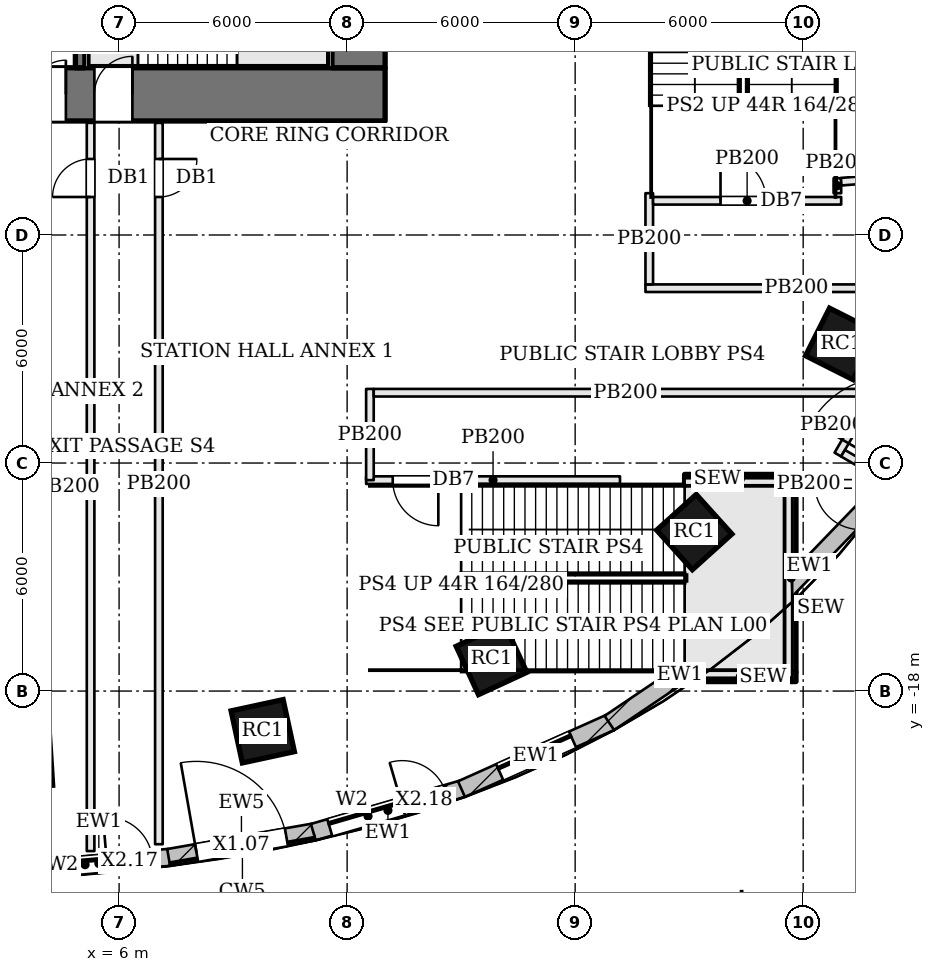
"""IFC4 building model, lengths in metres.
Left out: names, types, materials, properties, quantities, classifications, styles, units other than length and angle.
Written with IfcOpenShell. Run it as: python <this file> out.ifc"""

import sys

from ifc_helpers import new_model, si_unit, direction, frame, frame_2d, origin, origin_2d, place, context, subcontext, project, spatial, rectangle, extrude, element, fill, save


model = new_model("IFC4")
c1 = context("Model", 3, precision=1e-05, world=origin(), true_north=direction((0.0, 1.0)))
c2 = subcontext(c1, "Body", "Model", "MODEL_VIEW")
j1 = project(units=[si_unit("LENGTHUNIT", "METRE"), si_unit("PLANEANGLEUNIT", "RADIAN")], contexts=[c1])
p1 = place(None, origin())
s1 = spatial("IfcSite", under=j1, at=p1, CompositionType="ELEMENT")
p2 = place(p1, origin())
s2 = spatial("IfcBuilding", under=s1, at=p2, CompositionType="ELEMENT")
p3 = place(p2, origin())
s3 = spatial("IfcBuildingStorey", under=s2, at=p3, CompositionType="ELEMENT", Elevation=0.0)
p4 = place(p3, frame((-13.0, -2.3, 0.0), z_axis=(0.0, 0.0, 1.0), x_axis=(1.0, 0.0, 0.0)))
e1 = element("IfcWall", 1, at=p4, inside=s3, PredefinedType="SHEAR", context=c2, shape_type="SweptSolid", body=[
    extrude(rectangle(XDim=26.0, YDim=1.4, at=frame_2d((13.0, 0.0))), origin(), (0.0, 0.0, 1.0), 7.2),
])
p5 = place(p4, frame((9.275, 0.0, 0.0)))
e2 = element("IfcOpeningElement", 2, at=p5, cuts=e1, PredefinedType="OPENING", context=c2, shape_type="SweptSolid", body=[
    extrude(rectangle(XDim=0.9, YDim=2.1, at=frame_2d((0.45, 1.05))), frame((0.0, 0.71, 0.0), z_axis=(0.0, -1.0, 0.0), x_axis=(1.0, 0.0, 0.0)), (0.0, 0.0, 1.0), 1.42),
])
p6 = place(p4, frame((12.525, 0.0, 0.0)))
e3 = element("IfcOpeningElement", 3, at=p6, cuts=e1, PredefinedType="OPENING", context=c2, shape_type="SweptSolid", body=[
    extrude(rectangle(XDim=0.9, YDim=2.1, at=frame_2d((0.45, 1.05))), frame((0.0, 0.71, 0.0), z_axis=(0.0, -1.0, 0.0), x_axis=(1.0, 0.0, 0.0)), (0.0, 0.0, 1.0), 1.42),
])
p7 = place(p4, frame((15.0, 0.0, 0.0)))
e4 = element("IfcOpeningElement", 4, at=p7, cuts=e1, PredefinedType="OPENING", context=c2, shape_type="SweptSolid", body=[
    extrude(rectangle(XDim=1.0, YDim=2.1, at=frame_2d((0.5, 1.05))), frame((0.0, 0.71, 0.0), z_axis=(0.0, -1.0, 0.0), x_axis=(1.0, 0.0, 0.0)), (0.0, 0.0, 1.0), 1.42),
])
p8 = place(p4, frame((16.7, 0.0, 0.0)))
e5 = element("IfcOpeningElement", 5, at=p8, cuts=e1, PredefinedType="OPENING", context=c2, shape_type="SweptSolid", body=[
    extrude(rectangle(XDim=0.9, YDim=2.1, at=frame_2d((0.45, 1.05))), frame((0.0, 0.71, 0.0), z_axis=(0.0, -1.0, 0.0), x_axis=(1.0, 0.0, 0.0)), (0.0, 0.0, 1.0), 1.42),
])
p9 = place(p4, frame((6.65, 0.0, 0.0)))
e6 = element("IfcOpeningElement", 6, at=p9, cuts=e1, PredefinedType="OPENING", context=c2, shape_type="SweptSolid", body=[
    extrude(rectangle(XDim=1.0, YDim=2.1, at=frame_2d((0.5, 1.05))), frame((0.0, 0.71, 0.0), z_axis=(0.0, -1.0, 0.0), x_axis=(1.0, 0.0, 0.0)), (0.0, 0.0, 1.0), 1.42),
])
p10 = place(p4, frame((18.35, 0.0, 0.0)))
e7 = element("IfcOpeningElement", 7, at=p10, cuts=e1, PredefinedType="OPENING", context=c2, shape_type="SweptSolid", body=[
    extrude(rectangle(XDim=1.0, YDim=2.1, at=frame_2d((0.5, 1.05))), frame((0.0, 0.71, 0.0), z_axis=(0.0, -1.0, 0.0), x_axis=(1.0, 0.0, 0.0)), (0.0, 0.0, 1.0), 1.42),
])
p11 = place(p3, frame((12.3, -1.6, 0.0), z_axis=(0.0, 0.0, 1.0), x_axis=(0.0, 1.0, 0.0)))
e8 = element("IfcWall", 8, at=p11, inside=s3, PredefinedType="SHEAR", context=c2, shape_type="SweptSolid", body=[
    extrude(rectangle(XDim=12.2, YDim=1.4, at=frame_2d((6.1, 0.0))), origin(), (0.0, 0.0, 1.0), 7.2),
])
p12 = place(p11, frame((6.8, 0.0, 0.0)))
e9 = element("IfcOpeningElement", 9, at=p12, cuts=e8, PredefinedType="OPENING", context=c2, shape_type="SweptSolid", body=[
    extrude(rectangle(XDim=1.8, YDim=2.1, at=frame_2d((0.9, 1.05))), frame((0.0, 0.71, 0.0), z_axis=(0.0, -1.0, 0.0), x_axis=(1.0, 0.0, 0.0)), (0.0, 0.0, 1.0), 1.42),
])
for number, where, z_axis, x_axis in (
    (10, (3.509, -19.824, 0.0), (0.0, 0.0, 1.0), (0.998, 0.063, 0.0)),
    (11, (9.78, -19.058, 0.0), (0.0, 0.0, 1.0), (0.977, 0.211, 0.0)),
    (12, (15.799, -17.165, 0.0), (0.0, 0.0, 1.0), (0.908, 0.419, 0.0)),
    (13, (21.135, -13.817, 0.0), (0.0, 0.0, 1.0), (0.743, 0.67, 0.0)),
    (14, (25.003, -8.866, 0.0), (0.0, 0.0, 1.0), (0.45, 0.893, 0.0)),
):
    element("IfcColumn", number, at=place(p3, frame(where, z_axis=z_axis, x_axis=x_axis)), inside=s3, PredefinedType="COLUMN", context=c2, shape_type="SweptSolid", body=[
        extrude(rectangle(XDim=1.4, YDim=1.4, at=origin_2d()), origin(), (0.0, 0.0, 1.0), 7.2),
    ])
p13 = place(p3, frame((3.611, -22.698, 0.0), z_axis=(0.0, 0.0, 1.0), x_axis=(0.996259982326, 0.086406293838, 0.0)))
e15 = element("IfcWall", 15, at=p13, inside=s3, PredefinedType="SOLIDWALL", context=c2, shape_type="SweptSolid", body=[
    extrude(rectangle(XDim=3.727, YDim=0.45, at=frame_2d((1.863, 0.0))), origin(), (0.0, 0.0, 1.0), 6.95),
])
p14 = place(p13, frame((0.45, 0.0, 0.9)))
e16 = element("IfcOpeningElement", 16, at=p14, cuts=e15, PredefinedType="OPENING", context=c2, shape_type="SweptSolid", body=[
    extrude(rectangle(XDim=2.1, YDim=5.0, at=frame_2d((1.05, 2.5))), frame((0.0, 0.235, 0.0), z_axis=(0.0, -1.0, 0.0), x_axis=(1.0, 0.0, 0.0)), (0.0, 0.0, 1.0), 0.47),
])
p15 = place(p13, frame((2.077, 0.0, 0.0)))
e17 = element("IfcOpeningElement", 17, at=p15, cuts=e15, PredefinedType="OPENING", context=c2, shape_type="SweptSolid", body=[
    extrude(rectangle(XDim=1.2, YDim=2.4, at=frame_2d((0.6, 1.2))), frame((0.0, 0.235, 0.0), z_axis=(0.0, -1.0, 0.0), x_axis=(1.0, 0.0, 0.0)), (0.0, 0.0, 1.0), 0.47),
])
p16 = place(p3, frame((7.304, -22.378, 0.0), z_axis=(0.0, 0.0, 1.0), x_axis=(0.984947461591, 0.172853978566, 0.0)))
e18 = element("IfcWall", 18, at=p16, inside=s3, PredefinedType="SOLIDWALL", context=c2, shape_type="SweptSolid", body=[
    extrude(rectangle(XDim=3.888, YDim=0.45, at=frame_2d((1.944, 0.0))), origin(), (0.0, 0.0, 1.0), 3.55),
])
p17 = place(p16, frame((0.744, 0.0, 0.0)))
e19 = element("IfcOpeningElement", 19, at=p17, cuts=e18, PredefinedType="OPENING", context=c2, shape_type="SweptSolid", body=[
    extrude(rectangle(XDim=2.4, YDim=3.2, at=frame_2d((1.2, 1.6))), frame((0.0, 0.235, 0.0), z_axis=(0.0, -1.0, 0.0), x_axis=(1.0, 0.0, 0.0)), (0.0, 0.0, 1.0), 0.47),
])
p18 = place(p3, frame((11.11, -21.712, 0.0), z_axis=(0.0, 0.0, 1.0), x_axis=(0.960186274122, 0.279360553743, 0.0)))
e20 = element("IfcWall", 20, at=p18, inside=s3, PredefinedType="SOLIDWALL", context=c2, shape_type="SweptSolid", body=[
    extrude(rectangle(XDim=4.091, YDim=0.45, at=frame_2d((2.045, 0.0))), origin(), (0.0, 0.0, 1.0), 6.95),
])
p19 = place(p18, frame((0.45, 0.0, 0.9)))
e21 = element("IfcOpeningElement", 21, at=p19, cuts=e20, PredefinedType="OPENING", context=c2, shape_type="SweptSolid", body=[
    extrude(rectangle(XDim=2.1, YDim=5.0, at=frame_2d((1.05, 2.5))), frame((0.0, 0.235, 0.0), z_axis=(0.0, -1.0, 0.0), x_axis=(1.0, 0.0, 0.0)), (0.0, 0.0, 1.0), 0.47),
])
p20 = place(p18, frame((2.441, 0.0, 0.0)))
e22 = element("IfcOpeningElement", 22, at=p20, cuts=e20, PredefinedType="OPENING", context=c2, shape_type="SweptSolid", body=[
    extrude(rectangle(XDim=1.2, YDim=2.4, at=frame_2d((0.6, 1.2))), frame((0.0, 0.235, 0.0), z_axis=(0.0, -1.0, 0.0), x_axis=(1.0, 0.0, 0.0)), (0.0, 0.0, 1.0), 0.47),
])
p21 = place(p3, frame((15.009, -20.58, 0.0), z_axis=(0.0, 0.0, 1.0), x_axis=(0.912571415594, 0.408917365052, 0.0)))
e23 = element("IfcWall", 23, at=p21, inside=s3, PredefinedType="SOLIDWALL", context=c2, shape_type="SweptSolid", body=[
    extrude(rectangle(XDim=4.301, YDim=0.45, at=frame_2d((2.15, 0.0))), origin(), (0.0, 0.0, 1.0), 6.95),
])
p22 = place(p21, frame((1.101, 0.0, 0.9)))
e24 = element("IfcOpeningElement", 24, at=p22, cuts=e23, PredefinedType="OPENING", context=c2, shape_type="SweptSolid", body=[
    extrude(rectangle(XDim=2.1, YDim=5.0, at=frame_2d((1.05, 2.5))), frame((0.0, 0.235, 0.0), z_axis=(0.0, -1.0, 0.0), x_axis=(1.0, 0.0, 0.0)), (0.0, 0.0, 1.0), 0.47),
])
p23 = place(p3, frame((18.9, -18.84, 0.0), z_axis=(0.0, 0.0, 1.0), x_axis=(0.828976924359, 0.559282807604, 0.0)))
e25 = element("IfcWall", 25, at=p23, inside=s3, PredefinedType="SOLIDWALL", context=c2, shape_type="SweptSolid", body=[
    extrude(rectangle(XDim=4.479, YDim=0.45, at=frame_2d((2.24, 0.0))), origin(), (0.0, 0.0, 1.0), 6.95),
])
p24 = place(p3, frame((22.577, -16.365, 0.0), z_axis=(0.0, 0.0, 1.0), x_axis=(0.694191591241, 0.719790271294, 0.0)))
e26 = element("IfcWall", 26, at=p24, inside=s3, PredefinedType="SOLIDWALL", context=c2, shape_type="SweptSolid", body=[
    extrude(rectangle(XDim=4.597, YDim=0.45, at=frame_2d((2.298, 0.0))), origin(), (0.0, 0.0, 1.0), 6.95),
])
p25 = place(p3, frame((4.975, 10.6, 0.0), z_axis=(0.0, 0.0, 1.0), x_axis=(0.0, -1.0, 0.0)))
e27 = element("IfcWall", 27, at=p25, inside=s3, PredefinedType="SOLIDWALL", context=c2, shape_type="SweptSolid", body=[
    extrude(rectangle(XDim=12.2, YDim=0.25, at=frame_2d((6.1, 0.0))), origin(), (0.0, 0.0, 1.0), 6.95),
])
p26 = place(p25, frame((4.65, 0.0, 0.0)))
e28 = element("IfcOpeningElement", 28, at=p26, cuts=e27, PredefinedType="OPENING", context=c2, shape_type="SweptSolid", body=[
    extrude(rectangle(XDim=1.2, YDim=2.1, at=frame_2d((0.6, 1.05))), frame((0.0, 0.135, 0.0), z_axis=(0.0, -1.0, 0.0), x_axis=(1.0, 0.0, 0.0)), (0.0, 0.0, 1.0), 0.27),
])
p27 = place(p3, frame((7.047, -3.05, 0.0), z_axis=(0.0, 0.0, 1.0), x_axis=(0.0, -1.0, 0.0)))
e29 = element("IfcWall", 29, at=p27, inside=s3, PredefinedType="PARTITIONING", context=c2, shape_type="SweptSolid", body=[
    extrude(rectangle(XDim=18.98, YDim=0.2, at=frame_2d((9.49, 0.0))), origin(), (0.0, 0.0, 1.0), 6.23),
])
p28 = place(p27, frame((0.95, 0.0, 0.0)))
e30 = element("IfcOpeningElement", 30, at=p28, cuts=e29, PredefinedType="OPENING", context=c2, shape_type="SweptSolid", body=[
    extrude(rectangle(XDim=1.0, YDim=2.1, at=frame_2d((0.5, 1.05))), frame((0.0, 0.11, 0.0), z_axis=(0.0, -1.0, 0.0), x_axis=(1.0, 0.0, 0.0)), (0.0, 0.0, 1.0), 0.22),
])
p29 = place(p3, frame((5.25, -22.21, 0.0), z_axis=(0.0, 0.0, 1.0), x_axis=(0.0, 1.0, 0.0)))
e31 = element("IfcWall", 31, at=p29, inside=s3, PredefinedType="PARTITIONING", context=c2, shape_type="SweptSolid", body=[
    extrude(rectangle(XDim=19.16, YDim=0.2, at=frame_2d((9.58, 0.0))), origin(), (0.0, 0.0, 1.0), 6.23),
])
p30 = place(p29, frame((17.21, 0.0, 0.0)))
e32 = element("IfcOpeningElement", 32, at=p30, cuts=e31, PredefinedType="OPENING", context=c2, shape_type="SweptSolid", body=[
    extrude(rectangle(XDim=1.0, YDim=2.1, at=frame_2d((0.5, 1.05))), frame((0.0, 0.11, 0.0), z_axis=(0.0, -1.0, 0.0), x_axis=(1.0, 0.0, 0.0)), (0.0, 0.0, 1.0), 0.22),
])
p31 = place(p3, frame((27.8, -7.4, 0.0), z_axis=(0.0, 0.0, 1.0), x_axis=(-1.0, 0.0, 0.0)))
e33 = element("IfcWall", 33, at=p31, inside=s3, PredefinedType="PARTITIONING", context=c2, shape_type="SweptSolid", body=[
    extrude(rectangle(XDim=7.95, YDim=0.2, at=frame_2d((3.975, 0.0))), origin(), (0.0, 0.0, 1.0), 6.23),
])
p32 = place(p3, frame((19.95, -7.3, 0.0), z_axis=(0.0, 0.0, 1.0), x_axis=(0.0, 1.0, 0.0)))
e34 = element("IfcWall", 34, at=p32, inside=s3, PredefinedType="PARTITIONING", context=c2, shape_type="SweptSolid", body=[
    extrude(rectangle(XDim=2.4, YDim=0.2, at=frame_2d((1.2, 0.0))), origin(), (0.0, 0.0, 1.0), 6.23),
])
p33 = place(p3, frame((20.05, -5.1, 0.0), z_axis=(0.0, 0.0, 1.0), x_axis=(1.0, 0.0, 0.0)))
e35 = element("IfcWall", 35, at=p33, inside=s3, PredefinedType="PARTITIONING", context=c2, shape_type="SweptSolid", body=[
    extrude(rectangle(XDim=4.95, YDim=0.2, at=frame_2d((2.475, 0.0))), origin(), (0.0, 0.0, 1.0), 6.23),
])
p34 = place(p33, frame((1.775, 0.0, 0.0)))
e36 = element("IfcOpeningElement", 36, at=p34, cuts=e35, PredefinedType="OPENING", context=c2, shape_type="SweptSolid", body=[
    extrude(rectangle(XDim=1.2, YDim=2.1, at=frame_2d((0.6, 1.05))), frame((0.0, 0.11, 0.0), z_axis=(0.0, -1.0, 0.0), x_axis=(1.0, 0.0, 0.0)), (0.0, 0.0, 1.0), 0.22),
])
p35 = place(p3, frame((24.9, -4.9, 0.0), z_axis=(0.0, 0.0, 1.0), x_axis=(0.0, 1.0, 0.0)))
e37 = element("IfcWall", 37, at=p35, inside=s3, PredefinedType="PARTITIONING", context=c2, shape_type="SweptSolid", body=[
    extrude(rectangle(XDim=0.394, YDim=0.2, at=frame_2d((0.197, 0.0))), origin(), (0.0, 0.0, 1.0), 6.23),
])
p36 = place(p3, frame((25.0, -4.598, 0.0), z_axis=(0.0, 0.0, 1.0), x_axis=(0.996848217345, 0.079332411888, 0.0)))
e38 = element("IfcWall", 38, at=p36, inside=s3, PredefinedType="PARTITIONING", context=c2, shape_type="SweptSolid", body=[
    extrude(rectangle(XDim=3.314, YDim=0.2, at=frame_2d((1.657, 0.0))), origin(), (0.0, 0.0, 1.0), 6.23),
])
p37 = place(p3, frame((25.66, -12.55, 0.0), z_axis=(0.0, 0.0, 1.0), x_axis=(-1.0, 0.0, 0.0)))
e39 = element("IfcWall", 39, at=p37, inside=s3, PredefinedType="PARTITIONING", context=c2, shape_type="SweptSolid", body=[
    extrude(rectangle(XDim=1.83, YDim=0.2, at=frame_2d((0.915, 0.0))), origin(), (0.0, 0.0, 1.0), 6.23),
])
p38 = place(p37, frame((0.153, 0.0, 0.0)))
e40 = element("IfcOpeningElement", 40, at=p38, cuts=e39, PredefinedType="OPENING", context=c2, shape_type="SweptSolid", body=[
    extrude(rectangle(XDim=1.2, YDim=2.1, at=frame_2d((0.6, 1.05))), frame((0.0, 0.11, 0.0), z_axis=(0.0, -1.0, 0.0), x_axis=(1.0, 0.0, 0.0)), (0.0, 0.0, 1.0), 0.22),
])
p39 = place(p3, frame((19.18, -12.45, 0.0), z_axis=(0.0, 0.0, 1.0), x_axis=(-1.0, 0.0, 0.0)))
e41 = element("IfcWall", 41, at=p39, inside=s3, PredefinedType="PARTITIONING", context=c2, shape_type="SweptSolid", body=[
    extrude(rectangle(XDim=6.68, YDim=0.2, at=frame_2d((3.34, 0.0))), origin(), (0.0, 0.0, 1.0), 6.23),
])
p40 = place(p39, frame((4.78, 0.0, 0.0)))
e42 = element("IfcOpeningElement", 42, at=p40, cuts=e41, PredefinedType="OPENING", context=c2, shape_type="SweptSolid", body=[
    extrude(rectangle(XDim=1.2, YDim=2.1, at=frame_2d((0.6, 1.05))), frame((0.0, 0.11, 0.0), z_axis=(0.0, -1.0, 0.0), x_axis=(1.0, 0.0, 0.0)), (0.0, 0.0, 1.0), 0.22),
])
p41 = place(p3, frame((12.6, -12.45, 0.0), z_axis=(0.0, 0.0, 1.0), x_axis=(0.0, 1.0, 0.0)))
e43 = element("IfcWall", 43, at=p41, inside=s3, PredefinedType="PARTITIONING", context=c2, shape_type="SweptSolid", body=[
    extrude(rectangle(XDim=2.4, YDim=0.2, at=frame_2d((1.2, 0.0))), origin(), (0.0, 0.0, 1.0), 6.23),
])
p42 = place(p3, frame((12.7, -10.15, 0.0), z_axis=(0.0, 0.0, 1.0), x_axis=(1.0, 0.0, 0.0)))
e44 = element("IfcWall", 44, at=p42, inside=s3, PredefinedType="PARTITIONING", context=c2, shape_type="SweptSolid", body=[
    extrude(rectangle(XDim=13.257, YDim=0.2, at=frame_2d((6.628, 0.0))), origin(), (0.0, 0.0, 1.0), 6.23),
])
p43 = place(p3, frame((25.807, -10.236, 0.0), z_axis=(0.0, 0.0, 1.0), x_axis=(-0.50189432983, -0.864928946032, 0.0)))
e45 = element("IfcWall", 45, at=p43, inside=s3, PredefinedType="PARTITIONING", context=c2, shape_type="SweptSolid", body=[
    extrude(rectangle(XDim=1.783, YDim=0.2, at=frame_2d((0.891, 0.0))), origin(), (0.0, 0.0, 1.0), 6.23),
])
p44 = place(p3, frame((25.048, -11.742, 0.0), z_axis=(0.0, 0.0, 1.0), x_axis=(0.864728870448, -0.502238967638, 0.0)))
e46 = element("IfcWall", 46, at=p44, inside=s3, PredefinedType="PARTITIONING", context=c2, shape_type="SweptSolid", body=[
    extrude(rectangle(XDim=0.968, YDim=0.2, at=frame_2d((0.484, 0.0))), origin(), (0.0, 0.0, 1.0), 6.23),
])
p45 = place(p3, frame((23.685, -17.5, 0.0), z_axis=(0.0, 0.0, 1.0), x_axis=(0.0, 1.0, 0.0)))
e47 = element("IfcWall", 47, at=p45, inside=s3, PredefinedType="SOLIDWALL", context=c2, shape_type="SweptSolid", body=[
    extrude(rectangle(XDim=4.95, YDim=0.25, at=frame_2d((2.475, 0.0))), origin(), (0.0, 0.0, 1.0), 6.95),
])
for number, where, z_axis, x_axis in (
    (48, (20.88, -17.625, 0.0), (0.0, 0.0, 1.0), (1.0, 0.0, 0.0)),
    (49, (20.88, -12.425, 0.0), (0.0, 0.0, 1.0), (1.0, 0.0, 0.0)),
):
    element("IfcWall", number, at=place(p3, frame(where, z_axis=z_axis, x_axis=x_axis)), inside=s3, PredefinedType="SOLIDWALL", context=c2, shape_type="SweptSolid", body=[
        extrude(rectangle(XDim=2.93, YDim=0.25, at=frame_2d((1.465, 0.0))), origin(), (0.0, 0.0, 1.0), 6.95),
    ])
p46 = place(p14, origin())
e50 = element("IfcWindow", 50, at=p46, inside=s3, PartitioningType="SINGLE_PANEL", PredefinedType="WINDOW", context=c2, shape_type="SweptSolid", body=[
    extrude(rectangle(XDim=2.1, YDim=5.0, at=frame_2d((1.05, 2.5))), frame((0.0, 0.135, 0.0), z_axis=(0.0, -1.0, 0.0), x_axis=(1.0, 0.0, 0.0)), (0.0, 0.0, 1.0), 0.06),
])
fill(e16, e50)
p47 = place(p15, frame((1.2, 0.0, 0.0), z_axis=(0.0, 0.0, 1.0), x_axis=(-1.0, 0.0, 0.0)))
e51 = element("IfcDoor", 51, at=p47, inside=s3, OperationType="SINGLE_SWING_LEFT", PredefinedType="DOOR", context=c2, shape_type="SweptSolid", body=[
    extrude(rectangle(XDim=1.2, YDim=2.4, at=frame_2d((0.6, 1.2))), frame((0.0, 0.025, 0.0), z_axis=(0.0, -1.0, 0.0), x_axis=(1.0, 0.0, 0.0)), (0.0, 0.0, 1.0), 0.05),
])
fill(e17, e51)
p48 = place(p17, origin())
e52 = element("IfcDoor", 52, at=p48, inside=s3, OperationType="DOUBLE_DOOR_DOUBLE_SWING", PredefinedType="DOOR", context=c2, shape_type="SweptSolid", body=[
    extrude(rectangle(XDim=2.4, YDim=3.2, at=frame_2d((1.2, 1.6))), frame((0.0, 0.025, 0.0), z_axis=(0.0, -1.0, 0.0), x_axis=(1.0, 0.0, 0.0)), (0.0, 0.0, 1.0), 0.05),
])
fill(e19, e52)
p49 = place(p19, origin())
e53 = element("IfcWindow", 53, at=p49, inside=s3, PartitioningType="SINGLE_PANEL", PredefinedType="WINDOW", context=c2, shape_type="SweptSolid", body=[
    extrude(rectangle(XDim=2.1, YDim=5.0, at=frame_2d((1.05, 2.5))), frame((0.0, 0.135, 0.0), z_axis=(0.0, -1.0, 0.0), x_axis=(1.0, 0.0, 0.0)), (0.0, 0.0, 1.0), 0.06),
])
fill(e21, e53)
p50 = place(p20, frame((1.2, 0.0, 0.0), z_axis=(0.0, 0.0, 1.0), x_axis=(-1.0, 0.0, 0.0)))
e54 = element("IfcDoor", 54, at=p50, inside=s3, OperationType="SINGLE_SWING_LEFT", PredefinedType="DOOR", context=c2, shape_type="SweptSolid", body=[
    extrude(rectangle(XDim=1.2, YDim=2.4, at=frame_2d((0.6, 1.2))), frame((0.0, 0.025, 0.0), z_axis=(0.0, -1.0, 0.0), x_axis=(1.0, 0.0, 0.0)), (0.0, 0.0, 1.0), 0.05),
])
fill(e22, e54)
p51 = place(p22, origin())
e55 = element("IfcWindow", 55, at=p51, inside=s3, PartitioningType="SINGLE_PANEL", PredefinedType="WINDOW", context=c2, shape_type="SweptSolid", body=[
    extrude(rectangle(XDim=2.1, YDim=5.0, at=frame_2d((1.05, 2.5))), frame((0.0, 0.135, 0.0), z_axis=(0.0, -1.0, 0.0), x_axis=(1.0, 0.0, 0.0)), (0.0, 0.0, 1.0), 0.06),
])
fill(e24, e55)
p52 = place(p8, origin())
e56 = element("IfcDoor", 56, at=p52, inside=s3, OperationType="SINGLE_SWING_RIGHT", PredefinedType="DOOR", context=c2, shape_type="SweptSolid", body=[
    extrude(rectangle(XDim=0.9, YDim=2.1, at=frame_2d((0.45, 1.05))), frame((0.0, 0.025, 0.0), z_axis=(0.0, -1.0, 0.0), x_axis=(1.0, 0.0, 0.0)), (0.0, 0.0, 1.0), 0.05),
])
fill(e5, e56)
p53 = place(p10, origin())
e57 = element("IfcDoor", 57, at=p53, inside=s3, OperationType="SINGLE_SWING_RIGHT", PredefinedType="DOOR", context=c2, shape_type="SweptSolid", body=[
    extrude(rectangle(XDim=1.0, YDim=2.1, at=frame_2d((0.5, 1.05))), frame((0.0, 0.025, 0.0), z_axis=(0.0, -1.0, 0.0), x_axis=(1.0, 0.0, 0.0)), (0.0, 0.0, 1.0), 0.05),
])
fill(e7, e57)
p54 = place(p28, origin())
e58 = element("IfcDoor", 58, at=p54, inside=s3, OperationType="SINGLE_SWING_LEFT", PredefinedType="DOOR", context=c2, shape_type="SweptSolid", body=[
    extrude(rectangle(XDim=1.0, YDim=2.1, at=frame_2d((0.5, 1.05))), frame((0.0, 0.025, 0.0), z_axis=(0.0, -1.0, 0.0), x_axis=(1.0, 0.0, 0.0)), (0.0, 0.0, 1.0), 0.05),
])
fill(e30, e58)
p55 = place(p30, origin())
e59 = element("IfcDoor", 59, at=p55, inside=s3, OperationType="SINGLE_SWING_LEFT", PredefinedType="DOOR", context=c2, shape_type="SweptSolid", body=[
    extrude(rectangle(XDim=1.0, YDim=2.1, at=frame_2d((0.5, 1.05))), frame((0.0, 0.025, 0.0), z_axis=(0.0, -1.0, 0.0), x_axis=(1.0, 0.0, 0.0)), (0.0, 0.0, 1.0), 0.05),
])
fill(e32, e59)
p56 = place(p34, origin())
e60 = element("IfcDoor", 60, at=p56, inside=s3, OperationType="SINGLE_SWING_LEFT", PredefinedType="DOOR", context=c2, shape_type="SweptSolid", body=[
    extrude(rectangle(XDim=1.2, YDim=2.1, at=frame_2d((0.6, 1.05))), frame((0.0, 0.025, 0.0), z_axis=(0.0, -1.0, 0.0), x_axis=(1.0, 0.0, 0.0)), (0.0, 0.0, 1.0), 0.05),
])
fill(e36, e60)
p57 = place(p40, origin())
e61 = element("IfcDoor", 61, at=p57, inside=s3, OperationType="SINGLE_SWING_LEFT", PredefinedType="DOOR", context=c2, shape_type="SweptSolid", body=[
    extrude(rectangle(XDim=1.2, YDim=2.1, at=frame_2d((0.6, 1.05))), frame((0.0, 0.025, 0.0), z_axis=(0.0, -1.0, 0.0), x_axis=(1.0, 0.0, 0.0)), (0.0, 0.0, 1.0), 0.05),
])
fill(e42, e61)
p58 = place(p38, origin())
e62 = element("IfcDoor", 62, at=p58, inside=s3, OperationType="SINGLE_SWING_LEFT", PredefinedType="DOOR", context=c2, shape_type="SweptSolid", body=[
    extrude(rectangle(XDim=1.2, YDim=2.1, at=frame_2d((0.6, 1.05))), frame((0.0, 0.025, 0.0), z_axis=(0.0, -1.0, 0.0), x_axis=(1.0, 0.0, 0.0)), (0.0, 0.0, 1.0), 0.05),
])
fill(e40, e62)
save(model, sys.argv[1])
